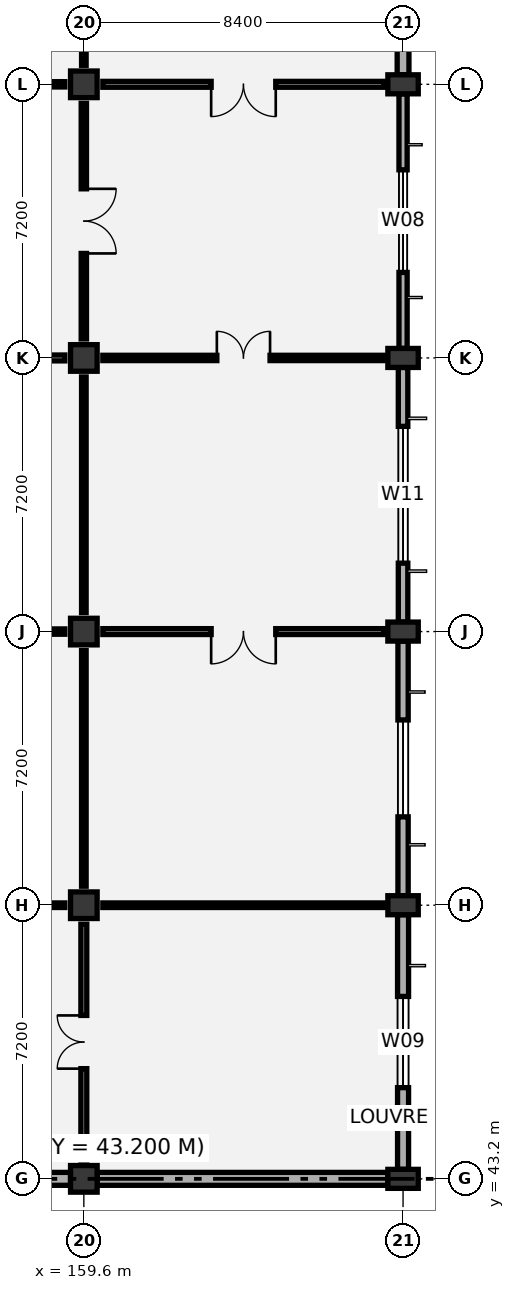
"""IFC4 building model, lengths in metres.
Left out: names, types, materials, properties, quantities, classifications, styles, units other than length and angle.
Written with IfcOpenShell. Run it as: python <this file> out.ifc"""

import sys

from ifc_helpers import new_model, si_unit, direction, frame, frame_2d, origin, origin_2d, place, context, subcontext, project, spatial, rectangle, extrude, element, fill, save


model = new_model("IFC4")
c1 = context("Model", 3, precision=1e-05, world=origin(), true_north=direction((0.0, 1.0)))
c2 = subcontext(c1, "Body", "Model", "MODEL_VIEW")
j1 = project(units=[si_unit("LENGTHUNIT", "METRE"), si_unit("PLANEANGLEUNIT", "RADIAN")], contexts=[c1])
p1 = place(None, origin())
s1 = spatial("IfcSite", under=j1, at=p1, CompositionType="ELEMENT")
p2 = place(p1, origin())
s2 = spatial("IfcBuilding", under=s1, at=p2, CompositionType="ELEMENT")
p3 = place(p2, frame((0.0, 0.0, 6.0)))
s3 = spatial("IfcBuildingStorey", under=s2, at=p3, CompositionType="ELEMENT", Elevation=6.0)
for number, where, z_axis, x_axis in (
    (1, (159.6, 43.2, 0.0), (0.0, 0.0, 1.0), (1.0, 0.0, 0.0)),
    (2, (159.6, 50.4, 0.0), (0.0, 0.0, 1.0), (1.0, 0.0, 0.0)),
    (3, (159.6, 57.6, 0.0), (0.0, 0.0, 1.0), (1.0, 0.0, 0.0)),
    (4, (159.6, 64.8, 0.0), (0.0, 0.0, 1.0), (1.0, 0.0, 0.0)),
    (5, (159.6, 72.0, 0.0), (0.0, 0.0, 1.0), (1.0, 0.0, 0.0)),
):
    element("IfcColumn", number, at=place(p3, frame(where, z_axis=z_axis, x_axis=x_axis)), inside=s3, PredefinedType="COLUMN", context=c2, shape_type="SweptSolid", body=[
        extrude(rectangle(XDim=0.7, YDim=0.7, at=origin_2d()), origin(), (0.0, 0.0, 1.0), 5.4),
    ])
for number, where, z_axis, x_axis in (
    (6, (168.0, 43.2, 0.0), (0.0, 0.0, 1.0), (0.0, 1.0, 0.0)),
    (7, (168.0, 50.4, 0.0), (0.0, 0.0, 1.0), (0.0, 1.0, 0.0)),
    (8, (168.0, 57.6, 0.0), (0.0, 0.0, 1.0), (0.0, 1.0, 0.0)),
    (9, (168.0, 64.8, 0.0), (0.0, 0.0, 1.0), (0.0, 1.0, 0.0)),
    (10, (168.0, 72.0, 0.0), (0.0, 0.0, 1.0), (0.0, 1.0, 0.0)),
):
    element("IfcColumn", number, at=place(p3, frame(where, z_axis=z_axis, x_axis=x_axis)), inside=s3, PredefinedType="COLUMN", context=c2, shape_type="SweptSolid", body=[
        extrude(rectangle(XDim=0.5, YDim=0.8, at=origin_2d()), origin(), (0.0, 0.0, 1.0), 5.4),
    ])
p4 = place(p3, frame((151.55, 43.2, 0.0), z_axis=(0.0, 0.0, 1.0), x_axis=(1.0, 0.0, 0.0)))
e11 = element("IfcWall", 11, at=p4, inside=s3, PredefinedType="SOLIDWALL", context=c2, shape_type="SweptSolid", body=[
    extrude(rectangle(XDim=7.7, YDim=0.34, at=frame_2d((3.85, 0.0))), origin(), (0.0, 0.0, 1.0), 4.42),
])
p5 = place(p3, frame((159.95, 43.2, 0.0), z_axis=(0.0, 0.0, 1.0), x_axis=(1.0, 0.0, 0.0)))
e12 = element("IfcWall", 12, at=p5, inside=s3, PredefinedType="SOLIDWALL", context=c2, shape_type="SweptSolid", body=[
    extrude(rectangle(XDim=7.65, YDim=0.34, at=frame_2d((3.825, 0.0))), origin(), (0.0, 0.0, 1.0), 4.52),
])
p6 = place(p3, frame((168.0, 43.45, 0.0), z_axis=(0.0, 0.0, 1.0), x_axis=(0.0, 1.0, 0.0)))
e13 = element("IfcWall", 13, at=p6, inside=s3, PredefinedType="SOLIDWALL", context=c2, shape_type="SweptSolid", body=[
    extrude(rectangle(XDim=6.7, YDim=0.29, at=frame_2d((3.35, 0.0))), origin(), (0.0, 0.0, 1.0), 4.52),
])
p7 = place(p6, frame((2.15, 0.0, 0.9)))
e14 = element("IfcOpeningElement", 14, at=p7, cuts=e13, PredefinedType="OPENING", context=c2, shape_type="SweptSolid", body=[
    extrude(rectangle(XDim=2.4, YDim=2.1, at=frame_2d((1.2, 1.05))), frame((0.0, 0.155, 0.0), z_axis=(0.0, -1.0, 0.0), x_axis=(1.0, 0.0, 0.0)), (0.0, 0.0, 1.0), 0.31),
])
p8 = place(p3, frame((168.0, 50.65, 0.0), z_axis=(0.0, 0.0, 1.0), x_axis=(0.0, 1.0, 0.0)))
e15 = element("IfcWall", 15, at=p8, inside=s3, PredefinedType="SOLIDWALL", context=c2, shape_type="SweptSolid", body=[
    extrude(rectangle(XDim=6.7, YDim=0.27, at=frame_2d((3.35, 0.0))), origin(), (0.0, 0.0, 1.0), 4.52),
])
p9 = place(p8, frame((2.075, 0.0, 0.9)))
e16 = element("IfcOpeningElement", 16, at=p9, cuts=e15, PredefinedType="OPENING", context=c2, shape_type="SweptSolid", body=[
    extrude(rectangle(XDim=2.55, YDim=1.95, at=frame_2d((1.275, 0.975))), frame((0.0, 0.145, 0.0), z_axis=(0.0, -1.0, 0.0), x_axis=(1.0, 0.0, 0.0)), (0.0, 0.0, 1.0), 0.29),
])
p10 = place(p3, frame((168.0, 57.85, 0.0), z_axis=(0.0, 0.0, 1.0), x_axis=(0.0, 1.0, 0.0)))
e17 = element("IfcWall", 17, at=p10, inside=s3, PredefinedType="SOLIDWALL", context=c2, shape_type="SweptSolid", body=[
    extrude(rectangle(XDim=6.7, YDim=0.25, at=frame_2d((3.35, 0.0))), origin(), (0.0, 0.0, 1.0), 4.52),
])
p11 = place(p10, frame((1.55, 0.0, 0.9)))
e18 = element("IfcOpeningElement", 18, at=p11, cuts=e17, PredefinedType="OPENING", context=c2, shape_type="SweptSolid", body=[
    extrude(rectangle(XDim=3.6, YDim=2.4, at=frame_2d((1.8, 1.2))), frame((0.0, 0.135, 0.0), z_axis=(0.0, -1.0, 0.0), x_axis=(1.0, 0.0, 0.0)), (0.0, 0.0, 1.0), 0.27),
])
p12 = place(p3, frame((168.0, 65.05, 0.0), z_axis=(0.0, 0.0, 1.0), x_axis=(0.0, 1.0, 0.0)))
e19 = element("IfcWall", 19, at=p12, inside=s3, PredefinedType="SOLIDWALL", context=c2, shape_type="SweptSolid", body=[
    extrude(rectangle(XDim=6.7, YDim=0.215, at=frame_2d((3.35, 0.0))), origin(), (0.0, 0.0, 1.0), 4.52),
])
p13 = place(p12, frame((2.0, 0.0, 0.9)))
e20 = element("IfcOpeningElement", 20, at=p13, cuts=e19, PredefinedType="OPENING", context=c2, shape_type="SweptSolid", body=[
    extrude(rectangle(XDim=2.7, YDim=2.1, at=frame_2d((1.35, 1.05))), frame((0.0, 0.117, 0.0), z_axis=(0.0, -1.0, 0.0), x_axis=(1.0, 0.0, 0.0)), (0.0, 0.0, 1.0), 0.235),
])
p14 = place(p3, frame((168.0, 72.25, 0.0), z_axis=(0.0, 0.0, 1.0), x_axis=(0.0, 1.0, 0.0)))
e21 = element("IfcWall", 21, at=p14, inside=s3, PredefinedType="SOLIDWALL", context=c2, shape_type="SweptSolid", body=[
    extrude(rectangle(XDim=6.7, YDim=0.31, at=frame_2d((3.35, 0.0))), origin(), (0.0, 0.0, 1.0), 4.52),
])
p15 = place(p14, frame((1.925, 0.0, 0.9)))
e22 = element("IfcOpeningElement", 22, at=p15, cuts=e21, PredefinedType="OPENING", context=c2, shape_type="SweptSolid", body=[
    extrude(rectangle(XDim=2.85, YDim=1.95, at=frame_2d((1.425, 0.975))), frame((0.0, 0.165, 0.0), z_axis=(0.0, -1.0, 0.0), x_axis=(1.0, 0.0, 0.0)), (0.0, 0.0, 1.0), 0.33),
])
p16 = place(p3, frame((159.6, 43.7, 0.0), z_axis=(0.0, 0.0, 1.0), x_axis=(0.0, 1.0, 0.0)))
e23 = element("IfcWall", 23, at=p16, inside=s3, PredefinedType="PARTITIONING", context=c2, shape_type="SweptSolid", body=[
    extrude(rectangle(XDim=6.2, YDim=0.155, at=frame_2d((3.1, 0.0))), origin(), (0.0, 0.0, 1.0), 4.78),
])
p17 = place(p16, frame((2.4, 0.0, 0.0)))
e24 = element("IfcOpeningElement", 24, at=p17, cuts=e23, PredefinedType="OPENING", context=c2, shape_type="SweptSolid", body=[
    extrude(rectangle(XDim=1.4, YDim=2.15, at=frame_2d((0.7, 1.075))), frame((0.0, 0.087, 0.0), z_axis=(0.0, -1.0, 0.0), x_axis=(1.0, 0.0, 0.0)), (0.0, 0.0, 1.0), 0.175),
])
p18 = place(p3, frame((151.7, 50.4, 0.0), z_axis=(0.0, 0.0, 1.0), x_axis=(1.0, 0.0, 0.0)))
e25 = element("IfcWall", 25, at=p18, inside=s3, PredefinedType="PARTITIONING", context=c2, shape_type="SweptSolid", body=[
    extrude(rectangle(XDim=7.4, YDim=0.12, at=frame_2d((3.7, 0.0))), origin(), (0.0, 0.0, 1.0), 4.27),
])
p19 = place(p3, frame((159.6, 50.9, 0.0), z_axis=(0.0, 0.0, 1.0), x_axis=(0.0, 1.0, 0.0)))
e26 = element("IfcWall", 26, at=p19, inside=s3, PredefinedType="PARTITIONING", context=c2, shape_type="SweptSolid", body=[
    extrude(rectangle(XDim=6.2, YDim=0.12, at=frame_2d((3.1, 0.0))), origin(), (0.0, 0.0, 1.0), 4.32),
])
p20 = place(p3, frame((151.7, 57.6, 0.0), z_axis=(0.0, 0.0, 1.0), x_axis=(1.0, 0.0, 0.0)))
e27 = element("IfcWall", 27, at=p20, inside=s3, PredefinedType="PARTITIONING", context=c2, shape_type="SweptSolid", body=[
    extrude(rectangle(XDim=7.4, YDim=0.14, at=frame_2d((3.7, 0.0))), origin(), (0.0, 0.0, 1.0), 4.27),
])
p21 = place(p20, frame((2.85, 0.0, 0.0)))
e28 = element("IfcOpeningElement", 28, at=p21, cuts=e27, PredefinedType="OPENING", context=c2, shape_type="SweptSolid", body=[
    extrude(rectangle(XDim=1.7, YDim=2.25, at=frame_2d((0.85, 1.125))), frame((0.0, 0.08, 0.0), z_axis=(0.0, -1.0, 0.0), x_axis=(1.0, 0.0, 0.0)), (0.0, 0.0, 1.0), 0.16),
])
p22 = place(p3, frame((159.6, 58.1, 0.0), z_axis=(0.0, 0.0, 1.0), x_axis=(0.0, 1.0, 0.0)))
e29 = element("IfcWall", 29, at=p22, inside=s3, PredefinedType="PARTITIONING", context=c2, shape_type="SweptSolid", body=[
    extrude(rectangle(XDim=6.2, YDim=0.12, at=frame_2d((3.1, 0.0))), origin(), (0.0, 0.0, 1.0), 4.57),
])
p23 = place(p3, frame((151.7, 64.8, 0.0), z_axis=(0.0, 0.0, 1.0), x_axis=(1.0, 0.0, 0.0)))
e30 = element("IfcWall", 30, at=p23, inside=s3, PredefinedType="PARTITIONING", context=c2, shape_type="SweptSolid", body=[
    extrude(rectangle(XDim=7.4, YDim=0.155, at=frame_2d((3.7, 0.0))), origin(), (0.0, 0.0, 1.0), 4.27),
])
p24 = place(p23, frame((3.0, 0.0, 0.0)))
e31 = element("IfcOpeningElement", 31, at=p24, cuts=e30, PredefinedType="OPENING", context=c2, shape_type="SweptSolid", body=[
    extrude(rectangle(XDim=1.4, YDim=2.15, at=frame_2d((0.7, 1.075))), frame((0.0, 0.087, 0.0), z_axis=(0.0, -1.0, 0.0), x_axis=(1.0, 0.0, 0.0)), (0.0, 0.0, 1.0), 0.175),
])
p25 = place(p3, frame((159.6, 65.3, 0.0), z_axis=(0.0, 0.0, 1.0), x_axis=(0.0, 1.0, 0.0)))
e32 = element("IfcWall", 32, at=p25, inside=s3, PredefinedType="PARTITIONING", context=c2, shape_type="SweptSolid", body=[
    extrude(rectangle(XDim=6.2, YDim=0.14, at=frame_2d((3.1, 0.0))), origin(), (0.0, 0.0, 1.0), 4.32),
])
p26 = place(p25, frame((2.25, 0.0, 0.0)))
e33 = element("IfcOpeningElement", 33, at=p26, cuts=e32, PredefinedType="OPENING", context=c2, shape_type="SweptSolid", body=[
    extrude(rectangle(XDim=1.7, YDim=2.25, at=frame_2d((0.85, 1.125))), frame((0.0, 0.08, 0.0), z_axis=(0.0, -1.0, 0.0), x_axis=(1.0, 0.0, 0.0)), (0.0, 0.0, 1.0), 0.16),
])
p27 = place(p3, frame((151.7, 72.0, 0.0), z_axis=(0.0, 0.0, 1.0), x_axis=(1.0, 0.0, 0.0)))
e34 = element("IfcWall", 34, at=p27, inside=s3, PredefinedType="PARTITIONING", context=c2, shape_type="SweptSolid", body=[
    extrude(rectangle(XDim=7.4, YDim=0.14, at=frame_2d((3.7, 0.0))), origin(), (0.0, 0.0, 1.0), 4.27),
])
p28 = place(p27, frame((3.0, 0.0, 0.0)))
e35 = element("IfcOpeningElement", 35, at=p28, cuts=e34, PredefinedType="OPENING", context=c2, shape_type="SweptSolid", body=[
    extrude(rectangle(XDim=1.4, YDim=2.15, at=frame_2d((0.7, 1.075))), frame((0.0, 0.08, 0.0), z_axis=(0.0, -1.0, 0.0), x_axis=(1.0, 0.0, 0.0)), (0.0, 0.0, 1.0), 0.16),
])
p29 = place(p3, frame((159.6, 72.5, 0.0), z_axis=(0.0, 0.0, 1.0), x_axis=(0.0, 1.0, 0.0)))
e36 = element("IfcWall", 36, at=p29, inside=s3, PredefinedType="PARTITIONING", context=c2, shape_type="SweptSolid", body=[
    extrude(rectangle(XDim=6.2, YDim=0.12, at=frame_2d((3.1, 0.0))), origin(), (0.0, 0.0, 1.0), 4.67),
])
p30 = place(p3, frame((160.1, 50.4, 0.0), z_axis=(0.0, 0.0, 1.0), x_axis=(1.0, 0.0, 0.0)))
e37 = element("IfcWall", 37, at=p30, inside=s3, PredefinedType="PARTITIONING", context=c2, shape_type="SweptSolid", body=[
    extrude(rectangle(XDim=7.4, YDim=0.12, at=frame_2d((3.7, 0.0))), origin(), (0.0, 0.0, 1.0), 4.37),
])
p31 = place(p3, frame((160.1, 57.6, 0.0), z_axis=(0.0, 0.0, 1.0), x_axis=(1.0, 0.0, 0.0)))
e38 = element("IfcWall", 38, at=p31, inside=s3, PredefinedType="PARTITIONING", context=c2, shape_type="SweptSolid", body=[
    extrude(rectangle(XDim=7.4, YDim=0.155, at=frame_2d((3.7, 0.0))), origin(), (0.0, 0.0, 1.0), 4.37),
])
p32 = place(p31, frame((2.85, 0.0, 0.0)))
e39 = element("IfcOpeningElement", 39, at=p32, cuts=e38, PredefinedType="OPENING", context=c2, shape_type="SweptSolid", body=[
    extrude(rectangle(XDim=1.7, YDim=2.25, at=frame_2d((0.85, 1.125))), frame((0.0, 0.087, 0.0), z_axis=(0.0, -1.0, 0.0), x_axis=(1.0, 0.0, 0.0)), (0.0, 0.0, 1.0), 0.175),
])
p33 = place(p3, frame((160.1, 64.8, 0.0), z_axis=(0.0, 0.0, 1.0), x_axis=(1.0, 0.0, 0.0)))
e40 = element("IfcWall", 40, at=p33, inside=s3, PredefinedType="PARTITIONING", context=c2, shape_type="SweptSolid", body=[
    extrude(rectangle(XDim=7.4, YDim=0.14, at=frame_2d((3.7, 0.0))), origin(), (0.0, 0.0, 1.0), 4.37),
])
p34 = place(p33, frame((3.0, 0.0, 0.0)))
e41 = element("IfcOpeningElement", 41, at=p34, cuts=e40, PredefinedType="OPENING", context=c2, shape_type="SweptSolid", body=[
    extrude(rectangle(XDim=1.4, YDim=2.15, at=frame_2d((0.7, 1.075))), frame((0.0, 0.08, 0.0), z_axis=(0.0, -1.0, 0.0), x_axis=(1.0, 0.0, 0.0)), (0.0, 0.0, 1.0), 0.16),
])
p35 = place(p3, frame((160.1, 72.0, 0.0), z_axis=(0.0, 0.0, 1.0), x_axis=(1.0, 0.0, 0.0)))
e42 = element("IfcWall", 42, at=p35, inside=s3, PredefinedType="PARTITIONING", context=c2, shape_type="SweptSolid", body=[
    extrude(rectangle(XDim=7.4, YDim=0.155, at=frame_2d((3.7, 0.0))), origin(), (0.0, 0.0, 1.0), 4.37),
])
p36 = place(p35, frame((2.85, 0.0, 0.0)))
e43 = element("IfcOpeningElement", 43, at=p36, cuts=e42, PredefinedType="OPENING", context=c2, shape_type="SweptSolid", body=[
    extrude(rectangle(XDim=1.7, YDim=2.25, at=frame_2d((0.85, 1.125))), frame((0.0, 0.087, 0.0), z_axis=(0.0, -1.0, 0.0), x_axis=(1.0, 0.0, 0.0)), (0.0, 0.0, 1.0), 0.175),
])
p37 = place(p7, origin())
e44 = element("IfcWindow", 44, at=p37, inside=s3, PartitioningType="SINGLE_PANEL", PredefinedType="WINDOW", context=c2, shape_type="SweptSolid", body=[
    extrude(rectangle(XDim=2.4, YDim=2.1, at=frame_2d((1.2, 1.05))), frame((0.0, 0.03, 0.0), z_axis=(0.0, -1.0, 0.0), x_axis=(1.0, 0.0, 0.0)), (0.0, 0.0, 1.0), 0.06),
])
fill(e14, e44)
p38 = place(p9, origin())
e45 = element("IfcWindow", 45, at=p38, inside=s3, PartitioningType="SINGLE_PANEL", PredefinedType="WINDOW", context=c2, shape_type="SweptSolid", body=[
    extrude(rectangle(XDim=2.55, YDim=1.95, at=frame_2d((1.275, 0.975))), frame((0.0, 0.03, 0.0), z_axis=(0.0, -1.0, 0.0), x_axis=(1.0, 0.0, 0.0)), (0.0, 0.0, 1.0), 0.06),
])
fill(e16, e45)
p39 = place(p11, origin())
e46 = element("IfcWindow", 46, at=p39, inside=s3, PartitioningType="SINGLE_PANEL", PredefinedType="WINDOW", context=c2, shape_type="SweptSolid", body=[
    extrude(rectangle(XDim=3.6, YDim=2.4, at=frame_2d((1.8, 1.2))), frame((0.0, 0.03, 0.0), z_axis=(0.0, -1.0, 0.0), x_axis=(1.0, 0.0, 0.0)), (0.0, 0.0, 1.0), 0.06),
])
fill(e18, e46)
p40 = place(p13, origin())
e47 = element("IfcWindow", 47, at=p40, inside=s3, PartitioningType="SINGLE_PANEL", PredefinedType="WINDOW", context=c2, shape_type="SweptSolid", body=[
    extrude(rectangle(XDim=2.7, YDim=2.1, at=frame_2d((1.35, 1.05))), frame((0.0, 0.03, 0.0), z_axis=(0.0, -1.0, 0.0), x_axis=(1.0, 0.0, 0.0)), (0.0, 0.0, 1.0), 0.06),
])
fill(e20, e47)
p41 = place(p17, origin())
e48 = element("IfcDoor", 48, at=p41, inside=s3, OperationType="DOUBLE_DOOR_SINGLE_SWING", PredefinedType="DOOR", context=c2, shape_type="SweptSolid", body=[
    extrude(rectangle(XDim=1.4, YDim=2.15, at=frame_2d((0.7, 1.075))), frame((0.0, 0.025, 0.0), z_axis=(0.0, -1.0, 0.0), x_axis=(1.0, 0.0, 0.0)), (0.0, 0.0, 1.0), 0.05),
])
fill(e24, e48)
p42 = place(p26, frame((1.7, 0.0, 0.0), z_axis=(0.0, 0.0, 1.0), x_axis=(-1.0, 0.0, 0.0)))
e49 = element("IfcDoor", 49, at=p42, inside=s3, OperationType="DOUBLE_DOOR_SINGLE_SWING", PredefinedType="DOOR", context=c2, shape_type="SweptSolid", body=[
    extrude(rectangle(XDim=1.7, YDim=2.25, at=frame_2d((0.85, 1.125))), frame((0.0, 0.025, 0.0), z_axis=(0.0, -1.0, 0.0), x_axis=(1.0, 0.0, 0.0)), (0.0, 0.0, 1.0), 0.05),
])
fill(e33, e49)
p43 = place(p32, frame((1.7, 0.0, 0.0), z_axis=(0.0, 0.0, 1.0), x_axis=(-1.0, 0.0, 0.0)))
e50 = element("IfcDoor", 50, at=p43, inside=s3, OperationType="DOUBLE_DOOR_SINGLE_SWING", PredefinedType="DOOR", context=c2, shape_type="SweptSolid", body=[
    extrude(rectangle(XDim=1.7, YDim=2.25, at=frame_2d((0.85, 1.125))), frame((0.0, 0.025, 0.0), z_axis=(0.0, -1.0, 0.0), x_axis=(1.0, 0.0, 0.0)), (0.0, 0.0, 1.0), 0.05),
])
fill(e39, e50)
p44 = place(p34, origin())
e51 = element("IfcDoor", 51, at=p44, inside=s3, OperationType="DOUBLE_DOOR_SINGLE_SWING", PredefinedType="DOOR", context=c2, shape_type="SweptSolid", body=[
    extrude(rectangle(XDim=1.4, YDim=2.15, at=frame_2d((0.7, 1.075))), frame((0.0, 0.025, 0.0), z_axis=(0.0, -1.0, 0.0), x_axis=(1.0, 0.0, 0.0)), (0.0, 0.0, 1.0), 0.05),
])
fill(e41, e51)
p45 = place(p36, frame((1.7, 0.0, 0.0), z_axis=(0.0, 0.0, 1.0), x_axis=(-1.0, 0.0, 0.0)))
e52 = element("IfcDoor", 52, at=p45, inside=s3, OperationType="DOUBLE_DOOR_SINGLE_SWING", PredefinedType="DOOR", context=c2, shape_type="SweptSolid", body=[
    extrude(rectangle(XDim=1.7, YDim=2.25, at=frame_2d((0.85, 1.125))), frame((0.0, 0.025, 0.0), z_axis=(0.0, -1.0, 0.0), x_axis=(1.0, 0.0, 0.0)), (0.0, 0.0, 1.0), 0.05),
])
fill(e43, e52)
save(model, sys.argv[1])
